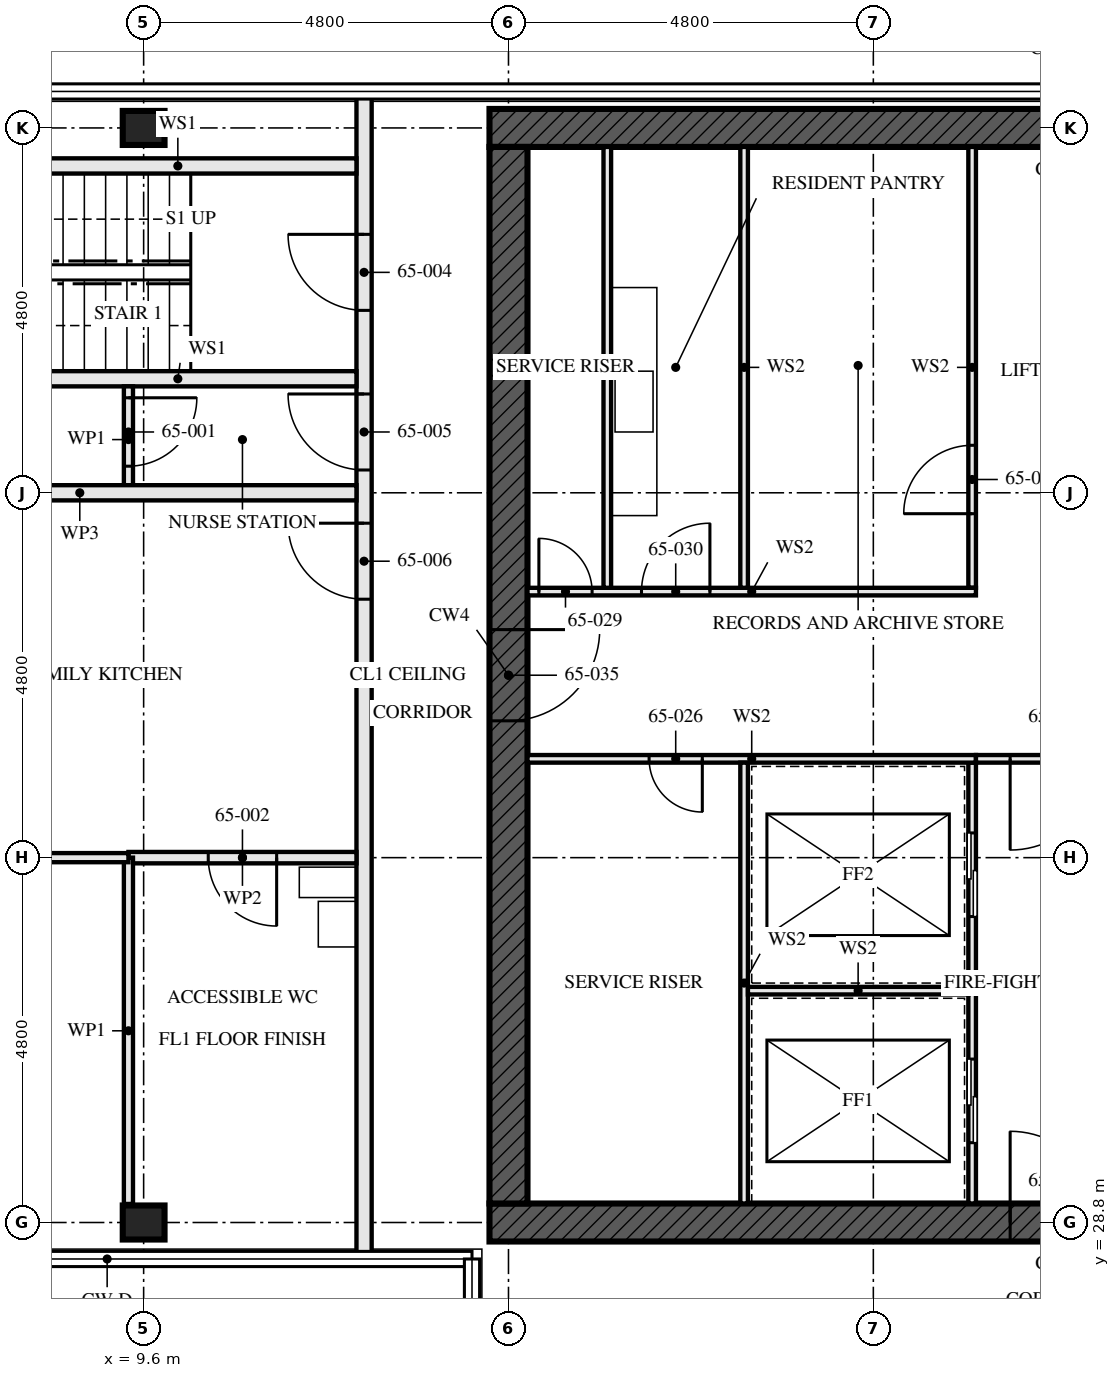
"""IFC4 building model, lengths in metres.
Left out: names, types, materials, properties, quantities, classifications, styles, units other than length and angle.
Written with IfcOpenShell. Run it as: python <this file> out.ifc"""

import sys

from ifc_helpers import new_model, si_unit, direction, frame, frame_2d, origin, origin_2d, place, context, subcontext, project, spatial, rectangle, i_section, extrude, element, fill, save


model = new_model("IFC4")
c1 = context("Model", 3, precision=1e-05, world=origin(), true_north=direction((0.0, 1.0)))
c2 = subcontext(c1, "Body", "Model", "MODEL_VIEW")
j1 = project(units=[si_unit("LENGTHUNIT", "METRE"), si_unit("PLANEANGLEUNIT", "RADIAN")], contexts=[c1])
p1 = place(None, origin())
s1 = spatial("IfcSite", under=j1, at=p1, CompositionType="ELEMENT")
p2 = place(p1, origin())
s2 = spatial("IfcBuilding", under=s1, at=p2, CompositionType="ELEMENT")
p3 = place(p2, frame((0.0, 0.0, 236.5)))
s3 = spatial("IfcBuildingStorey", under=s2, at=p3, CompositionType="ELEMENT", Elevation=236.5)
for number, where, z_axis, x_axis in (
    (1, (9.6, 28.8, 0.0), (0.0, 0.0, 1.0), (0.0, 1.0, 0.0)),
    (2, (9.6, 43.2, 0.0), (0.0, 0.0, 1.0), (0.0, 1.0, 0.0)),
):
    element("IfcColumn", number, at=place(p3, frame(where, z_axis=z_axis, x_axis=x_axis)), inside=s3, PredefinedType="COLUMN", context=c2, shape_type="SweptSolid", body=[
        extrude(i_section(OverallWidth=0.448, OverallDepth=0.55, WebThickness=0.072, FlangeThickness=0.115, FilletRadius=0.015, at=origin_2d()), origin(), (0.0, 0.0, 1.0), 3.5),
    ])
p4 = place(p3, frame((14.15, 28.8, -0.17), z_axis=(0.0, 0.0, 1.0), x_axis=(1.0, 0.0, 0.0)))
e3 = element("IfcWall", 3, at=p4, inside=s3, PredefinedType="SHEAR", context=c2, shape_type="SweptSolid", body=[
    extrude(rectangle(XDim=14.9, YDim=0.5, at=frame_2d((7.45, 0.0))), origin(), (0.0, 0.0, 1.0), 3.5),
])
p5 = place(p4, frame((6.85, 0.0, 0.17)))
e4 = element("IfcOpeningElement", 4, at=p5, cuts=e3, PredefinedType="OPENING", context=c2, shape_type="SweptSolid", body=[
    extrude(rectangle(XDim=1.2, YDim=2.1, at=frame_2d((0.6, 1.05))), frame((0.0, 0.26, 0.0), z_axis=(0.0, -1.0, 0.0), x_axis=(1.0, 0.0, 0.0)), (0.0, 0.0, 1.0), 0.521),
])
p6 = place(p3, frame((29.05, 43.2, -0.17), z_axis=(0.0, 0.0, 1.0), x_axis=(-1.0, 0.0, 0.0)))
e5 = element("IfcWall", 5, at=p6, inside=s3, PredefinedType="SHEAR", context=c2, shape_type="SweptSolid", body=[
    extrude(rectangle(XDim=14.9, YDim=0.5, at=frame_2d((7.45, 0.0))), origin(), (0.0, 0.0, 1.0), 3.5),
])
p7 = place(p3, frame((14.4, 42.95, -0.17), z_axis=(0.0, 0.0, 1.0), x_axis=(0.0, -1.0, 0.0)))
e6 = element("IfcWall", 6, at=p7, inside=s3, PredefinedType="SHEAR", context=c2, shape_type="SweptSolid", body=[
    extrude(rectangle(XDim=13.9, YDim=0.5, at=frame_2d((6.95, 0.0))), origin(), (0.0, 0.0, 1.0), 3.5),
])
p8 = place(p7, frame((6.35, 0.0, 0.17)))
e7 = element("IfcOpeningElement", 7, at=p8, cuts=e6, PredefinedType="OPENING", context=c2, shape_type="SweptSolid", body=[
    extrude(rectangle(XDim=1.2, YDim=2.1, at=frame_2d((0.6, 1.05))), frame((0.0, 0.26, 0.0), z_axis=(0.0, -1.0, 0.0), x_axis=(1.0, 0.0, 0.0)), (0.0, 0.0, 1.0), 0.521),
])
for number, where, z_axis, x_axis in (
    (8, (7.7, 42.7, 0.0), (0.0, 0.0, 1.0), (1.0, 0.0, 0.0)),
    (9, (7.7, 39.9, 0.0), (0.0, 0.0, 1.0), (1.0, 0.0, 0.0)),
):
    element("IfcWall", number, at=place(p3, frame(where, z_axis=z_axis, x_axis=x_axis)), inside=s3, PredefinedType="SOLIDWALL", context=c2, shape_type="SweptSolid", body=[
        extrude(rectangle(XDim=4.7, YDim=0.2, at=frame_2d((2.35, 0.0))), origin(), (0.0, 0.0, 1.0), 2.99),
    ])
p9 = place(p3, frame((9.4, 39.8, 0.0), z_axis=(0.0, 0.0, 1.0), x_axis=(0.0, -1.0, 0.0)))
e10 = element("IfcWall", 10, at=p9, inside=s3, PredefinedType="PARTITIONING", context=c2, shape_type="SweptSolid", body=[
    extrude(rectangle(XDim=1.4, YDim=0.12, at=frame_2d((0.7, 0.0))), origin(), (0.0, 0.0, 1.0), 3.33),
])
p10 = place(p9, frame((0.15, 0.0, 0.0)))
e11 = element("IfcOpeningElement", 11, at=p10, cuts=e10, PredefinedType="OPENING", context=c2, shape_type="SweptSolid", body=[
    extrude(rectangle(XDim=0.9, YDim=2.1, at=frame_2d((0.45, 1.05))), frame((0.0, 0.071, 0.0), z_axis=(0.0, -1.0, 0.0), x_axis=(1.0, 0.0, 0.0)), (0.0, 0.0, 1.0), 0.141),
])
p11 = place(p3, frame((5.12, 38.4, 0.0), z_axis=(0.0, 0.0, 1.0), x_axis=(1.0, 0.0, 0.0)))
e12 = element("IfcWall", 12, at=p11, inside=s3, PredefinedType="PARTITIONING", context=c2, shape_type="SweptSolid", body=[
    extrude(rectangle(XDim=7.28, YDim=0.2, at=frame_2d((3.64, 0.0))), origin(), (0.0, 0.0, 1.0), 2.55),
])
p12 = place(p3, frame((9.4, 33.6, 0.0), z_axis=(0.0, 0.0, 1.0), x_axis=(1.0, 0.0, 0.0)))
e13 = element("IfcWall", 13, at=p12, inside=s3, PredefinedType="PARTITIONING", context=c2, shape_type="SweptSolid", body=[
    extrude(rectangle(XDim=3.0, YDim=0.15, at=frame_2d((1.5, 0.0))), origin(), (0.0, 0.0, 1.0), 2.55),
])
p13 = place(p12, frame((1.05, 0.0, 0.0)))
e14 = element("IfcOpeningElement", 14, at=p13, cuts=e13, PredefinedType="OPENING", context=c2, shape_type="SweptSolid", body=[
    extrude(rectangle(XDim=0.9, YDim=2.1, at=frame_2d((0.45, 1.05))), frame((0.0, 0.085, 0.0), z_axis=(0.0, -1.0, 0.0), x_axis=(1.0, 0.0, 0.0)), (0.0, 0.0, 1.0), 0.171),
])
p14 = place(p3, frame((9.4, 33.6, 0.0), z_axis=(0.0, 0.0, 1.0), x_axis=(0.0, -1.0, 0.0)))
e15 = element("IfcWall", 15, at=p14, inside=s3, PredefinedType="PARTITIONING", context=c2, shape_type="SweptSolid", body=[
    extrude(rectangle(XDim=4.556, YDim=0.12, at=frame_2d((2.278, 0.0))), origin(), (0.0, 0.0, 1.0), 3.33),
])
p15 = place(p3, frame((5.7, 33.6, 0.0), z_axis=(0.0, 0.0, 1.0), x_axis=(1.0, 0.0, 0.0)))
e16 = element("IfcWall", 16, at=p15, inside=s3, PredefinedType="PARTITIONING", context=c2, shape_type="SweptSolid", body=[
    extrude(rectangle(XDim=3.7, YDim=0.12, at=frame_2d((1.85, 0.0))), origin(), (0.0, 0.0, 1.0), 2.55),
])
p16 = place(p3, frame((12.5, 43.655, 0.0), z_axis=(0.0, 0.0, 1.0), x_axis=(0.0, -1.0, 0.0)))
e17 = element("IfcWall", 17, at=p16, inside=s3, PredefinedType="PARTITIONING", context=c2, shape_type="SweptSolid", body=[
    extrude(rectangle(XDim=15.31, YDim=0.2, at=frame_2d((7.655, 0.0))), origin(), (0.0, 0.0, 1.0), 2.32),
])
p17 = place(p16, frame((1.855, 0.0, 0.0)))
e18 = element("IfcOpeningElement", 18, at=p17, cuts=e17, PredefinedType="OPENING", context=c2, shape_type="SweptSolid", body=[
    extrude(rectangle(XDim=1.0, YDim=2.1, at=frame_2d((0.5, 1.05))), frame((0.0, 0.111, 0.0), z_axis=(0.0, -1.0, 0.0), x_axis=(1.0, 0.0, 0.0)), (0.0, 0.0, 1.0), 0.221),
])
p18 = place(p16, frame((3.955, 0.0, 0.0)))
e19 = element("IfcOpeningElement", 19, at=p18, cuts=e17, PredefinedType="OPENING", context=c2, shape_type="SweptSolid", body=[
    extrude(rectangle(XDim=1.0, YDim=2.1, at=frame_2d((0.5, 1.05))), frame((0.0, 0.111, 0.0), z_axis=(0.0, -1.0, 0.0), x_axis=(1.0, 0.0, 0.0)), (0.0, 0.0, 1.0), 0.221),
])
p19 = place(p16, frame((5.655, 0.0, 0.0)))
e20 = element("IfcOpeningElement", 20, at=p19, cuts=e17, PredefinedType="OPENING", context=c2, shape_type="SweptSolid", body=[
    extrude(rectangle(XDim=1.0, YDim=2.1, at=frame_2d((0.5, 1.05))), frame((0.0, 0.111, 0.0), z_axis=(0.0, -1.0, 0.0), x_axis=(1.0, 0.0, 0.0)), (0.0, 0.0, 1.0), 0.221),
])
p20 = place(p3, frame((15.7, 37.15, 0.0), z_axis=(0.0, 0.0, 1.0), x_axis=(0.0, 1.0, 0.0)))
e21 = element("IfcWall", 21, at=p20, inside=s3, PredefinedType="SOLIDWALL", context=c2, shape_type="SweptSolid", body=[
    extrude(rectangle(XDim=5.8, YDim=0.1, at=frame_2d((2.9, 0.0))), origin(), (0.0, 0.0, 1.0), 3.33),
])
p21 = place(p3, frame((20.5, 29.05, 0.0), z_axis=(0.0, 0.0, 1.0), x_axis=(0.0, 1.0, 0.0)))
e22 = element("IfcWall", 22, at=p21, inside=s3, PredefinedType="SOLIDWALL", context=c2, shape_type="SweptSolid", body=[
    extrude(rectangle(XDim=5.8, YDim=0.1, at=frame_2d((2.9, 0.0))), origin(), (0.0, 0.0, 1.0), 3.33),
])
p22 = place(p21, frame((0.8, 0.0, 0.0)))
e23 = element("IfcOpeningElement", 23, at=p22, cuts=e22, PredefinedType="OPENING", context=c2, shape_type="SweptSolid", body=[
    extrude(rectangle(XDim=1.1, YDim=2.3, at=frame_2d((0.55, 1.15))), frame((0.0, 0.061, 0.0), z_axis=(0.0, -1.0, 0.0), x_axis=(1.0, 0.0, 0.0)), (0.0, 0.0, 1.0), 0.121),
])
p23 = place(p21, frame((3.775, 0.0, 0.0)))
e24 = element("IfcOpeningElement", 24, at=p23, cuts=e22, PredefinedType="OPENING", context=c2, shape_type="SweptSolid", body=[
    extrude(rectangle(XDim=1.1, YDim=2.3, at=frame_2d((0.55, 1.15))), frame((0.0, 0.061, 0.0), z_axis=(0.0, -1.0, 0.0), x_axis=(1.0, 0.0, 0.0)), (0.0, 0.0, 1.0), 0.121),
])
p24 = place(p3, frame((20.5, 37.15, 0.0), z_axis=(0.0, 0.0, 1.0), x_axis=(0.0, 1.0, 0.0)))
e25 = element("IfcWall", 25, at=p24, inside=s3, PredefinedType="SOLIDWALL", context=c2, shape_type="SweptSolid", body=[
    extrude(rectangle(XDim=5.8, YDim=0.1, at=frame_2d((2.9, 0.0))), origin(), (0.0, 0.0, 1.0), 3.33),
])
p25 = place(p24, frame((0.975, 0.0, 0.0)))
e26 = element("IfcOpeningElement", 26, at=p25, cuts=e25, PredefinedType="OPENING", context=c2, shape_type="SweptSolid", body=[
    extrude(rectangle(XDim=0.9, YDim=2.1, at=frame_2d((0.45, 1.05))), frame((0.0, 0.061, 0.0), z_axis=(0.0, -1.0, 0.0), x_axis=(1.0, 0.0, 0.0)), (0.0, 0.0, 1.0), 0.121),
])
p26 = place(p3, frame((14.65, 34.9, 0.0), z_axis=(0.0, 0.0, 1.0), x_axis=(1.0, 0.0, 0.0)))
e27 = element("IfcWall", 27, at=p26, inside=s3, PredefinedType="SOLIDWALL", context=c2, shape_type="SweptSolid", body=[
    extrude(rectangle(XDim=5.9, YDim=0.1, at=frame_2d((2.95, 0.0))), origin(), (0.0, 0.0, 1.0), 3.33),
])
p27 = place(p26, frame((1.6, 0.0, 0.0)))
e28 = element("IfcOpeningElement", 28, at=p27, cuts=e27, PredefinedType="OPENING", context=c2, shape_type="SweptSolid", body=[
    extrude(rectangle(XDim=0.7, YDim=2.1, at=frame_2d((0.35, 1.05))), frame((0.0, 0.061, 0.0), z_axis=(0.0, -1.0, 0.0), x_axis=(1.0, 0.0, 0.0)), (0.0, 0.0, 1.0), 0.121),
])
p28 = place(p3, frame((14.65, 37.1, 0.0), z_axis=(0.0, 0.0, 1.0), x_axis=(1.0, 0.0, 0.0)))
e29 = element("IfcWall", 29, at=p28, inside=s3, PredefinedType="SOLIDWALL", context=c2, shape_type="SweptSolid", body=[
    extrude(rectangle(XDim=5.9, YDim=0.1, at=frame_2d((2.95, 0.0))), origin(), (0.0, 0.0, 1.0), 3.33),
])
p29 = place(p28, frame((0.15, 0.0, 0.0)))
e30 = element("IfcOpeningElement", 30, at=p29, cuts=e29, PredefinedType="OPENING", context=c2, shape_type="SweptSolid", body=[
    extrude(rectangle(XDim=0.7, YDim=2.1, at=frame_2d((0.35, 1.05))), frame((0.0, 0.061, 0.0), z_axis=(0.0, -1.0, 0.0), x_axis=(1.0, 0.0, 0.0)), (0.0, 0.0, 1.0), 0.121),
])
p30 = place(p28, frame((1.5, 0.0, 0.0)))
e31 = element("IfcOpeningElement", 31, at=p30, cuts=e29, PredefinedType="OPENING", context=c2, shape_type="SweptSolid", body=[
    extrude(rectangle(XDim=0.9, YDim=2.1, at=frame_2d((0.45, 1.05))), frame((0.0, 0.061, 0.0), z_axis=(0.0, -1.0, 0.0), x_axis=(1.0, 0.0, 0.0)), (0.0, 0.0, 1.0), 0.121),
])
p31 = place(p3, frame((20.55, 34.9, 0.0), z_axis=(0.0, 0.0, 1.0), x_axis=(1.0, 0.0, 0.0)))
e32 = element("IfcWall", 32, at=p31, inside=s3, PredefinedType="SOLIDWALL", context=c2, shape_type="SweptSolid", body=[
    extrude(rectangle(XDim=2.5, YDim=0.1, at=frame_2d((1.25, 0.0))), origin(), (0.0, 0.0, 1.0), 3.33),
])
p32 = place(p31, frame((0.45, 0.0, 0.0)))
e33 = element("IfcOpeningElement", 33, at=p32, cuts=e32, PredefinedType="OPENING", context=c2, shape_type="SweptSolid", body=[
    extrude(rectangle(XDim=1.2, YDim=2.1, at=frame_2d((0.6, 1.05))), frame((0.0, 0.061, 0.0), z_axis=(0.0, -1.0, 0.0), x_axis=(1.0, 0.0, 0.0)), (0.0, 0.0, 1.0), 0.121),
])
p33 = place(p3, frame((17.5, 29.05, 0.0), z_axis=(0.0, 0.0, 1.0), x_axis=(0.0, 1.0, 0.0)))
e34 = element("IfcWall", 34, at=p33, inside=s3, PredefinedType="SOLIDWALL", context=c2, shape_type="SweptSolid", body=[
    extrude(rectangle(XDim=5.8, YDim=0.1, at=frame_2d((2.9, 0.0))), origin(), (0.0, 0.0, 1.0), 3.33),
])
p34 = place(p3, frame((17.55, 31.85, 0.0), z_axis=(0.0, 0.0, 1.0), x_axis=(1.0, 0.0, 0.0)))
e35 = element("IfcWall", 35, at=p34, inside=s3, PredefinedType="SOLIDWALL", context=c2, shape_type="SweptSolid", body=[
    extrude(rectangle(XDim=2.9, YDim=0.1, at=frame_2d((1.45, 0.0))), origin(), (0.0, 0.0, 1.0), 3.33),
])
p35 = place(p3, frame((17.5, 37.15, 0.0), z_axis=(0.0, 0.0, 1.0), x_axis=(0.0, 1.0, 0.0)))
e36 = element("IfcWall", 36, at=p35, inside=s3, PredefinedType="SOLIDWALL", context=c2, shape_type="SweptSolid", body=[
    extrude(rectangle(XDim=5.8, YDim=0.1, at=frame_2d((2.9, 0.0))), origin(), (0.0, 0.0, 1.0), 3.33),
])
p36 = place(p10, origin())
e37 = element("IfcDoor", 37, at=p36, inside=s3, OperationType="SINGLE_SWING_RIGHT", PredefinedType="DOOR", context=c2, shape_type="SweptSolid", body=[
    extrude(rectangle(XDim=0.9, YDim=2.1, at=frame_2d((0.45, 1.05))), frame((0.0, 0.022, 0.0), z_axis=(0.0, -1.0, 0.0), x_axis=(1.0, 0.0, 0.0)), (0.0, 0.0, 1.0), 0.044),
])
fill(e11, e37)
p37 = place(p13, frame((0.9, 0.0, 0.0), z_axis=(0.0, 0.0, 1.0), x_axis=(-1.0, 0.0, 0.0)))
e38 = element("IfcDoor", 38, at=p37, inside=s3, OperationType="SINGLE_SWING_RIGHT", PredefinedType="DOOR", context=c2, shape_type="SweptSolid", body=[
    extrude(rectangle(XDim=0.9, YDim=2.1, at=frame_2d((0.45, 1.05))), frame((0.0, 0.022, 0.0), z_axis=(0.0, -1.0, 0.0), x_axis=(1.0, 0.0, 0.0)), (0.0, 0.0, 1.0), 0.044),
])
fill(e14, e38)
p38 = place(p17, frame((1.0, 0.0, 0.0), z_axis=(0.0, 0.0, 1.0), x_axis=(-1.0, 0.0, 0.0)))
e39 = element("IfcDoor", 39, at=p38, inside=s3, OperationType="SINGLE_SWING_LEFT", PredefinedType="DOOR", context=c2, shape_type="SweptSolid", body=[
    extrude(rectangle(XDim=1.0, YDim=2.1, at=frame_2d((0.5, 1.05))), frame((0.0, 0.032, 0.0), z_axis=(0.0, -1.0, 0.0), x_axis=(1.0, 0.0, 0.0)), (0.0, 0.0, 1.0), 0.064),
])
fill(e18, e39)
p39 = place(p18, frame((1.0, 0.0, 0.0), z_axis=(0.0, 0.0, 1.0), x_axis=(-1.0, 0.0, 0.0)))
e40 = element("IfcDoor", 40, at=p39, inside=s3, OperationType="SINGLE_SWING_LEFT", PredefinedType="DOOR", context=c2, shape_type="SweptSolid", body=[
    extrude(rectangle(XDim=1.0, YDim=2.1, at=frame_2d((0.5, 1.05))), frame((0.0, 0.027, 0.0), z_axis=(0.0, -1.0, 0.0), x_axis=(1.0, 0.0, 0.0)), (0.0, 0.0, 1.0), 0.054),
])
fill(e19, e40)
p40 = place(p19, frame((1.0, 0.0, 0.0), z_axis=(0.0, 0.0, 1.0), x_axis=(-1.0, 0.0, 0.0)))
e41 = element("IfcDoor", 41, at=p40, inside=s3, OperationType="SINGLE_SWING_LEFT", PredefinedType="DOOR", context=c2, shape_type="SweptSolid", body=[
    extrude(rectangle(XDim=1.0, YDim=2.1, at=frame_2d((0.5, 1.05))), frame((0.0, 0.027, 0.0), z_axis=(0.0, -1.0, 0.0), x_axis=(1.0, 0.0, 0.0)), (0.0, 0.0, 1.0), 0.054),
])
fill(e20, e41)
p41 = place(p22, origin())
e42 = element("IfcDoor", 42, at=p41, inside=s3, OperationType="SLIDING_TO_LEFT", PredefinedType="DOOR", context=c2, shape_type="SweptSolid", body=[
    extrude(rectangle(XDim=1.1, YDim=2.3, at=frame_2d((0.55, 1.15))), frame((0.0, 0.05, 0.0), z_axis=(0.0, -1.0, 0.0), x_axis=(1.0, 0.0, 0.0)), (0.0, 0.0, 1.0), 0.1),
])
fill(e23, e42)
p42 = place(p23, origin())
e43 = element("IfcDoor", 43, at=p42, inside=s3, OperationType="SLIDING_TO_LEFT", PredefinedType="DOOR", context=c2, shape_type="SweptSolid", body=[
    extrude(rectangle(XDim=1.1, YDim=2.3, at=frame_2d((0.55, 1.15))), frame((0.0, 0.05, 0.0), z_axis=(0.0, -1.0, 0.0), x_axis=(1.0, 0.0, 0.0)), (0.0, 0.0, 1.0), 0.1),
])
fill(e24, e43)
p43 = place(p25, origin())
e44 = element("IfcDoor", 44, at=p43, inside=s3, OperationType="SINGLE_SWING_RIGHT", PredefinedType="DOOR", context=c2, shape_type="SweptSolid", body=[
    extrude(rectangle(XDim=0.9, YDim=2.1, at=frame_2d((0.45, 1.05))), frame((0.0, 0.027, 0.0), z_axis=(0.0, -1.0, 0.0), x_axis=(1.0, 0.0, 0.0)), (0.0, 0.0, 1.0), 0.054),
])
fill(e26, e44)
p44 = place(p27, frame((0.7, 0.0, 0.0), z_axis=(0.0, 0.0, 1.0), x_axis=(-1.0, 0.0, 0.0)))
e45 = element("IfcDoor", 45, at=p44, inside=s3, OperationType="SINGLE_SWING_RIGHT", PredefinedType="DOOR", context=c2, shape_type="SweptSolid", body=[
    extrude(rectangle(XDim=0.7, YDim=2.1, at=frame_2d((0.35, 1.05))), frame((0.0, 0.027, 0.0), z_axis=(0.0, -1.0, 0.0), x_axis=(1.0, 0.0, 0.0)), (0.0, 0.0, 1.0), 0.054),
])
fill(e28, e45)
p45 = place(p29, origin())
e46 = element("IfcDoor", 46, at=p45, inside=s3, OperationType="SINGLE_SWING_RIGHT", PredefinedType="DOOR", context=c2, shape_type="SweptSolid", body=[
    extrude(rectangle(XDim=0.7, YDim=2.1, at=frame_2d((0.35, 1.05))), frame((0.0, 0.027, 0.0), z_axis=(0.0, -1.0, 0.0), x_axis=(1.0, 0.0, 0.0)), (0.0, 0.0, 1.0), 0.054),
])
fill(e30, e46)
p46 = place(p30, origin())
e47 = element("IfcDoor", 47, at=p46, inside=s3, OperationType="SINGLE_SWING_LEFT", PredefinedType="DOOR", context=c2, shape_type="SweptSolid", body=[
    extrude(rectangle(XDim=0.9, YDim=2.1, at=frame_2d((0.45, 1.05))), frame((0.0, 0.027, 0.0), z_axis=(0.0, -1.0, 0.0), x_axis=(1.0, 0.0, 0.0)), (0.0, 0.0, 1.0), 0.054),
])
fill(e31, e47)
p47 = place(p32, frame((1.2, 0.0, 0.0), z_axis=(0.0, 0.0, 1.0), x_axis=(-1.0, 0.0, 0.0)))
e48 = element("IfcDoor", 48, at=p47, inside=s3, OperationType="SINGLE_SWING_LEFT", PredefinedType="DOOR", context=c2, shape_type="SweptSolid", body=[
    extrude(rectangle(XDim=1.2, YDim=2.1, at=frame_2d((0.6, 1.05))), frame((0.0, 0.027, 0.0), z_axis=(0.0, -1.0, 0.0), x_axis=(1.0, 0.0, 0.0)), (0.0, 0.0, 1.0), 0.054),
])
fill(e33, e48)
p48 = place(p5, origin())
e49 = element("IfcDoor", 49, at=p48, inside=s3, OperationType="SINGLE_SWING_LEFT", PredefinedType="DOOR", context=c2, shape_type="SweptSolid", body=[
    extrude(rectangle(XDim=1.2, YDim=2.1, at=frame_2d((0.6, 1.05))), frame((0.0, 0.027, 0.0), z_axis=(0.0, -1.0, 0.0), x_axis=(1.0, 0.0, 0.0)), (0.0, 0.0, 1.0), 0.054),
])
fill(e4, e49)
p49 = place(p8, origin())
e50 = element("IfcDoor", 50, at=p49, inside=s3, OperationType="SINGLE_SWING_LEFT", PredefinedType="DOOR", context=c2, shape_type="SweptSolid", body=[
    extrude(rectangle(XDim=1.2, YDim=2.1, at=frame_2d((0.6, 1.05))), frame((0.0, 0.027, 0.0), z_axis=(0.0, -1.0, 0.0), x_axis=(1.0, 0.0, 0.0)), (0.0, 0.0, 1.0), 0.054),
])
fill(e7, e50)
save(model, sys.argv[1])
